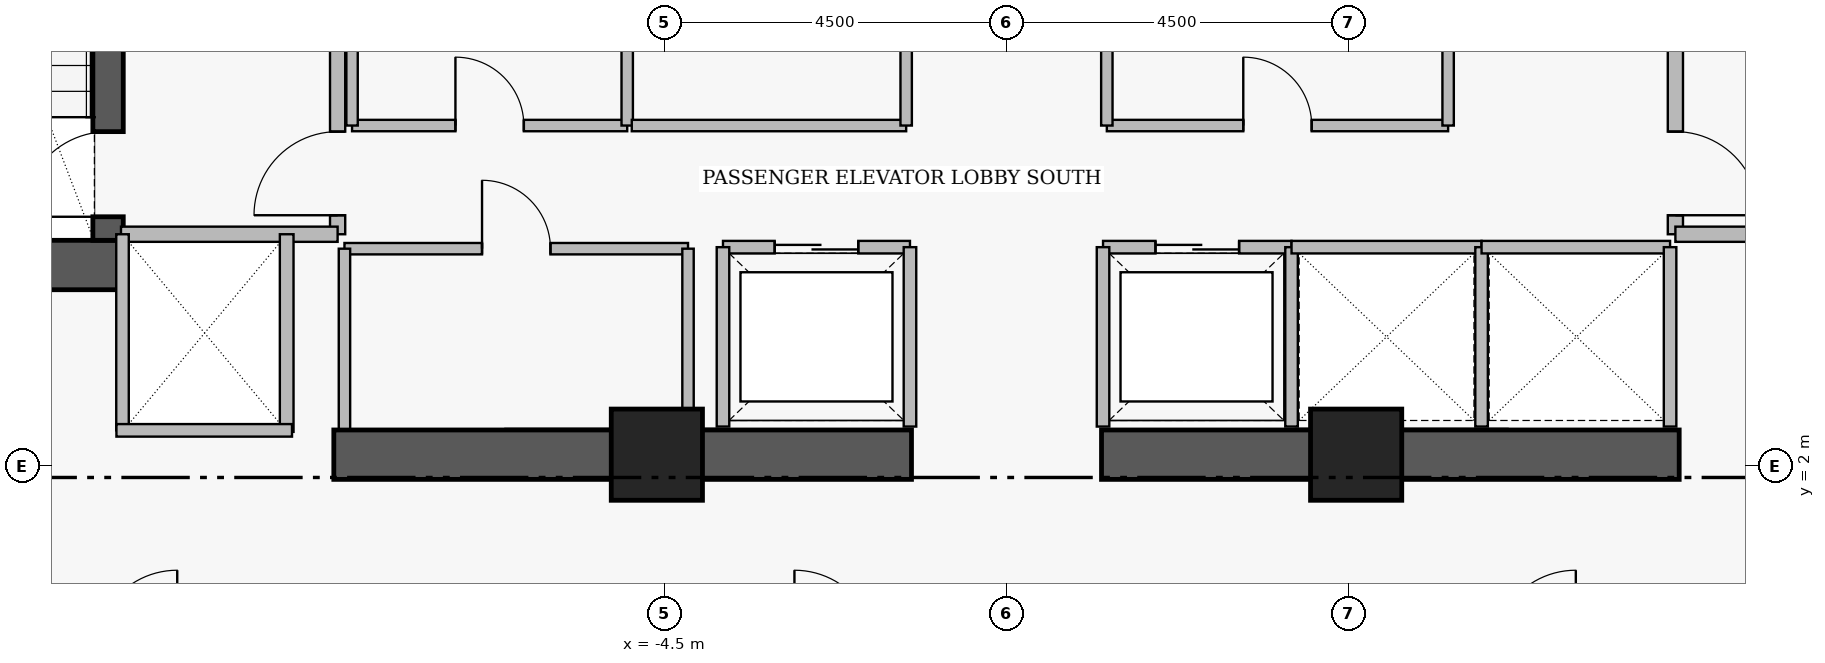
"""IFC4 building model, lengths in metres.
Left out: names, types, materials, properties, quantities, classifications, styles, units other than length and angle.
Written with IfcOpenShell. Run it as: python <this file> out.ifc"""

import sys

from ifc_helpers import new_model, si_unit, direction, frame, frame_2d, origin, origin_2d, place, context, subcontext, project, spatial, rectangle, extrude, element, fill, save


model = new_model("IFC4")
c1 = context("Model", 3, precision=1e-05, world=origin(), true_north=direction((0.0, 1.0)))
c2 = subcontext(c1, "Body", "Model", "MODEL_VIEW")
j1 = project(units=[si_unit("LENGTHUNIT", "METRE"), si_unit("PLANEANGLEUNIT", "RADIAN")], contexts=[c1])
p1 = place(None, origin())
s1 = spatial("IfcSite", under=j1, at=p1, CompositionType="ELEMENT")
p2 = place(p1, origin())
s2 = spatial("IfcBuilding", under=s1, at=p2, CompositionType="ELEMENT")
p3 = place(p2, frame((0.0, 0.0, 172.8)))
s3 = spatial("IfcBuildingStorey", under=s2, at=p3, CompositionType="ELEMENT", Elevation=172.8)
p4 = place(p3, frame((-16.06, 4.645, 0.0), z_axis=(0.0, 0.0, 1.0), x_axis=(1.0, 0.0, 0.0)))
e1 = element("IfcWall", 1, at=p4, inside=s3, PredefinedType="SHEAR", context=c2, shape_type="SweptSolid", body=[
    extrude(rectangle(XDim=4.46, YDim=0.65, at=frame_2d((2.23, 0.0))), origin(), (0.0, 0.0, 1.0), 4.41),
])
for number, where, z_axis, x_axis in (
    (2, (-8.85, 2.15, 0.0), (0.0, 0.0, 1.0), (1.0, 0.0, 0.0)),
    (3, (1.25, 2.15, 0.0), (0.0, 0.0, 1.0), (1.0, 0.0, 0.0)),
):
    element("IfcWall", number, at=place(p3, frame(where, z_axis=z_axis, x_axis=x_axis)), inside=s3, PredefinedType="SHEAR", context=c2, shape_type="SweptSolid", body=[
        extrude(rectangle(XDim=7.6, YDim=0.65, at=frame_2d((3.8, 0.0))), origin(), (0.0, 0.0, 1.0), 4.38),
    ])
p5 = place(p3, frame((-11.82, 4.97, 0.0), z_axis=(0.0, 0.0, 1.0), x_axis=(0.0, 1.0, 0.0)))
e4 = element("IfcWall", 4, at=p5, inside=s3, PredefinedType="SHEAR", context=c2, shape_type="SweptSolid", body=[
    extrude(rectangle(XDim=8.96, YDim=0.4, at=frame_2d((4.48, 0.0))), origin(), (0.0, 0.0, 1.0), 4.41),
])
p6 = place(p5, frame((0.31, 0.0, 0.0)))
e5 = element("IfcOpeningElement", 5, at=p6, cuts=e4, PredefinedType="OPENING", context=c2, shape_type="SweptSolid", body=[
    extrude(rectangle(XDim=1.12, YDim=2.22, at=frame_2d((0.56, 1.11))), frame((0.0, 0.21, 0.0), z_axis=(0.0, -1.0, 0.0), x_axis=(1.0, 0.0, 0.0)), (0.0, 0.0, 1.0), 0.42),
])
for number, where, z_axis, x_axis in (
    (6, (-4.6, 2.15, 0.0), (0.0, 0.0, 1.0), (1.0, 0.0, 0.0)),
    (7, (4.6, 2.15, 0.0), (0.0, 0.0, 1.0), (1.0, 0.0, 0.0)),
):
    element("IfcColumn", number, at=place(p3, frame(where, z_axis=z_axis, x_axis=x_axis)), inside=s3, PredefinedType="COLUMN", context=c2, shape_type="SweptSolid", body=[
        extrude(rectangle(XDim=1.2, YDim=1.2, at=origin_2d()), origin(), (0.0, 0.0, 1.0), 4.6),
    ])
p7 = place(p3, frame((-8.8, 5.05, 0.0), z_axis=(0.0, 0.0, 1.0), x_axis=(0.0, 1.0, 0.0)))
e8 = element("IfcWall", 8, at=p7, inside=s3, PredefinedType="PARTITIONING", context=c2, shape_type="SweptSolid", body=[
    extrude(rectangle(XDim=6.1, YDim=0.2, at=frame_2d((3.05, 0.0))), origin(), (0.0, 0.0, 1.0), 4.38),
])
p8 = place(p7, frame((0.25, 0.0, 0.0)))
e9 = element("IfcOpeningElement", 9, at=p8, cuts=e8, PredefinedType="OPENING", context=c2, shape_type="SweptSolid", body=[
    extrude(rectangle(XDim=1.1, YDim=2.2, at=frame_2d((0.55, 1.1))), frame((0.0, 0.11, 0.0), z_axis=(0.0, -1.0, 0.0), x_axis=(1.0, 0.0, 0.0)), (0.0, 0.0, 1.0), 0.22),
])
p9 = place(p7, frame((3.85, 0.0, 0.0)))
e10 = element("IfcOpeningElement", 10, at=p9, cuts=e8, PredefinedType="OPENING", context=c2, shape_type="SweptSolid", body=[
    extrude(rectangle(XDim=1.1, YDim=2.2, at=frame_2d((0.55, 1.1))), frame((0.0, 0.11, 0.0), z_axis=(0.0, -1.0, 0.0), x_axis=(1.0, 0.0, 0.0)), (0.0, 0.0, 1.0), 0.22),
])
p10 = place(p3, frame((8.8, 11.15, 0.0), z_axis=(0.0, 0.0, 1.0), x_axis=(0.0, -1.0, 0.0)))
e11 = element("IfcWall", 11, at=p10, inside=s3, PredefinedType="PARTITIONING", context=c2, shape_type="SweptSolid", body=[
    extrude(rectangle(XDim=6.1, YDim=0.2, at=frame_2d((3.05, 0.0))), origin(), (0.0, 0.0, 1.0), 4.38),
])
p11 = place(p10, frame((1.15, 0.0, 0.0)))
e12 = element("IfcOpeningElement", 12, at=p11, cuts=e11, PredefinedType="OPENING", context=c2, shape_type="SweptSolid", body=[
    extrude(rectangle(XDim=1.1, YDim=2.2, at=frame_2d((0.55, 1.1))), frame((0.0, 0.11, 0.0), z_axis=(0.0, -1.0, 0.0), x_axis=(1.0, 0.0, 0.0)), (0.0, 0.0, 1.0), 0.22),
])
p12 = place(p10, frame((4.75, 0.0, 0.0)))
e13 = element("IfcOpeningElement", 13, at=p12, cuts=e11, PredefinedType="OPENING", context=c2, shape_type="SweptSolid", body=[
    extrude(rectangle(XDim=1.1, YDim=2.2, at=frame_2d((0.55, 1.1))), frame((0.0, 0.11, 0.0), z_axis=(0.0, -1.0, 0.0), x_axis=(1.0, 0.0, 0.0)), (0.0, 0.0, 1.0), 0.22),
])
p13 = place(p3, frame((-3.73, 4.88, 0.0), z_axis=(0.0, 0.0, 1.0), x_axis=(1.0, 0.0, 0.0)))
e14 = element("IfcWall", 14, at=p13, inside=s3, PredefinedType="PARTITIONING", context=c2, shape_type="SweptSolid", body=[
    extrude(rectangle(XDim=2.46, YDim=0.165, at=frame_2d((1.23, 0.0))), origin(), (0.0, 0.0, 1.0), 4.38),
])
p14 = place(p13, frame((0.68, 0.0, 0.0)))
e15 = element("IfcOpeningElement", 15, at=p14, cuts=e14, PredefinedType="OPENING", context=c2, shape_type="SweptSolid", body=[
    extrude(rectangle(XDim=1.1, YDim=2.25, at=frame_2d((0.55, 1.125))), frame((0.0, 0.093, 0.0), z_axis=(0.0, -1.0, 0.0), x_axis=(1.0, 0.0, 0.0)), (0.0, 0.0, 1.0), 0.185),
])
p15 = place(p3, frame((1.27, 4.88, 0.0), z_axis=(0.0, 0.0, 1.0), x_axis=(1.0, 0.0, 0.0)))
e16 = element("IfcWall", 16, at=p15, inside=s3, PredefinedType="PARTITIONING", context=c2, shape_type="SweptSolid", body=[
    extrude(rectangle(XDim=2.48, YDim=0.165, at=frame_2d((1.24, 0.0))), origin(), (0.0, 0.0, 1.0), 4.38),
])
p16 = place(p15, frame((0.69, 0.0, 0.0)))
e17 = element("IfcOpeningElement", 17, at=p16, cuts=e16, PredefinedType="OPENING", context=c2, shape_type="SweptSolid", body=[
    extrude(rectangle(XDim=1.1, YDim=2.25, at=frame_2d((0.55, 1.125))), frame((0.0, 0.093, 0.0), z_axis=(0.0, -1.0, 0.0), x_axis=(1.0, 0.0, 0.0)), (0.0, 0.0, 1.0), 0.185),
])
p17 = place(p3, frame((-8.71, 4.86, 0.0), z_axis=(0.0, 0.0, 1.0), x_axis=(1.0, 0.0, 0.0)))
e18 = element("IfcWall", 18, at=p17, inside=s3, PredefinedType="PARTITIONING", context=c2, shape_type="SweptSolid", body=[
    extrude(rectangle(XDim=4.52, YDim=0.15, at=frame_2d((2.26, 0.0))), origin(), (0.0, 0.0, 1.0), 4.38),
])
p18 = place(p17, frame((1.81, 0.0, 0.0)))
e19 = element("IfcOpeningElement", 19, at=p18, cuts=e18, PredefinedType="OPENING", context=c2, shape_type="SweptSolid", body=[
    extrude(rectangle(XDim=0.9, YDim=2.15, at=frame_2d((0.45, 1.075))), frame((0.0, 0.085, 0.0), z_axis=(0.0, -1.0, 0.0), x_axis=(1.0, 0.0, 0.0)), (0.0, 0.0, 1.0), 0.17),
])
p19 = place(p3, frame((-8.61, 6.48, 0.0), z_axis=(0.0, 0.0, 1.0), x_axis=(1.0, 0.0, 0.0)))
e20 = element("IfcWall", 20, at=p19, inside=s3, PredefinedType="PARTITIONING", context=c2, shape_type="SweptSolid", body=[
    extrude(rectangle(XDim=3.62, YDim=0.15, at=frame_2d((1.81, 0.0))), origin(), (0.0, 0.0, 1.0), 4.38),
])
p20 = place(p19, frame((1.36, 0.0, 0.0)))
e21 = element("IfcOpeningElement", 21, at=p20, cuts=e20, PredefinedType="OPENING", context=c2, shape_type="SweptSolid", body=[
    extrude(rectangle(XDim=0.9, YDim=2.15, at=frame_2d((0.45, 1.075))), frame((0.0, 0.085, 0.0), z_axis=(0.0, -1.0, 0.0), x_axis=(1.0, 0.0, 0.0)), (0.0, 0.0, 1.0), 0.17),
])
p21 = place(p3, frame((1.32, 6.48, 0.0), z_axis=(0.0, 0.0, 1.0), x_axis=(1.0, 0.0, 0.0)))
e22 = element("IfcWall", 22, at=p21, inside=s3, PredefinedType="PARTITIONING", context=c2, shape_type="SweptSolid", body=[
    extrude(rectangle(XDim=4.49, YDim=0.15, at=frame_2d((2.245, 0.0))), origin(), (0.0, 0.0, 1.0), 4.38),
])
p22 = place(p21, frame((1.795, 0.0, 0.0)))
e23 = element("IfcOpeningElement", 23, at=p22, cuts=e22, PredefinedType="OPENING", context=c2, shape_type="SweptSolid", body=[
    extrude(rectangle(XDim=0.9, YDim=2.15, at=frame_2d((0.45, 1.075))), frame((0.0, 0.085, 0.0), z_axis=(0.0, -1.0, 0.0), x_axis=(1.0, 0.0, 0.0)), (0.0, 0.0, 1.0), 0.17),
])
for number, where, z_axis, x_axis in (
    (24, (-11.65, 5.05, 0.0), (0.0, 0.0, 1.0), (1.0, 0.0, 0.0)),
    (25, (8.8, 5.05, 0.0), (0.0, 0.0, 1.0), (1.0, 0.0, 0.0)),
):
    element("IfcWall", number, at=place(p3, frame(where, z_axis=z_axis, x_axis=x_axis)), inside=s3, PredefinedType="PARTITIONING", context=c2, shape_type="SweptSolid", body=[
        extrude(rectangle(XDim=2.85, YDim=0.2, at=frame_2d((1.425, 0.0))), origin(), (0.0, 0.0, 1.0), 4.38),
    ])
for number, where, z_axis, x_axis in (
    (26, (-3.73, 2.52, 0.0), (0.0, 0.0, 1.0), (0.0, 1.0, 0.0)),
    (27, (-1.27, 2.52, 0.0), (0.0, 0.0, 1.0), (0.0, 1.0, 0.0)),
    (28, (1.27, 2.52, 0.0), (0.0, 0.0, 1.0), (0.0, 1.0, 0.0)),
    (29, (3.75, 2.52, 0.0), (0.0, 0.0, 1.0), (0.0, 1.0, 0.0)),
):
    element("IfcWall", number, at=place(p3, frame(where, z_axis=z_axis, x_axis=x_axis)), inside=s3, PredefinedType="PARTITIONING", context=c2, shape_type="SweptSolid", body=[
        extrude(rectangle(XDim=2.36, YDim=0.165, at=frame_2d((1.18, 0.0))), origin(), (0.0, 0.0, 1.0), 4.38),
    ])
p23 = place(p3, frame((3.75, 4.88, 0.0), z_axis=(0.0, 0.0, 1.0), x_axis=(1.0, 0.0, 0.0)))
e30 = element("IfcWall", 30, at=p23, inside=s3, PredefinedType="PARTITIONING", context=c2, shape_type="SweptSolid", body=[
    extrude(rectangle(XDim=2.5, YDim=0.165, at=frame_2d((1.25, 0.0))), origin(), (0.0, 0.0, 1.0), 4.38),
])
p24 = place(p3, frame((6.25, 2.52, 0.0), z_axis=(0.0, 0.0, 1.0), x_axis=(0.0, 1.0, 0.0)))
e31 = element("IfcWall", 31, at=p24, inside=s3, PredefinedType="PARTITIONING", context=c2, shape_type="SweptSolid", body=[
    extrude(rectangle(XDim=2.36, YDim=0.165, at=frame_2d((1.18, 0.0))), origin(), (0.0, 0.0, 1.0), 4.38),
])
p25 = place(p3, frame((6.25, 4.88, 0.0), z_axis=(0.0, 0.0, 1.0), x_axis=(1.0, 0.0, 0.0)))
e32 = element("IfcWall", 32, at=p25, inside=s3, PredefinedType="PARTITIONING", context=c2, shape_type="SweptSolid", body=[
    extrude(rectangle(XDim=2.48, YDim=0.165, at=frame_2d((1.24, 0.0))), origin(), (0.0, 0.0, 1.0), 4.38),
])
p26 = place(p3, frame((8.73, 2.52, 0.0), z_axis=(0.0, 0.0, 1.0), x_axis=(0.0, 1.0, 0.0)))
e33 = element("IfcWall", 33, at=p26, inside=s3, PredefinedType="PARTITIONING", context=c2, shape_type="SweptSolid", body=[
    extrude(rectangle(XDim=2.36, YDim=0.165, at=frame_2d((1.18, 0.0))), origin(), (0.0, 0.0, 1.0), 4.38),
])
for number, where, z_axis, x_axis in (
    (34, (-8.71, 2.49, 0.0), (0.0, 0.0, 1.0), (0.0, 1.0, 0.0)),
    (35, (-4.19, 2.49, 0.0), (0.0, 0.0, 1.0), (0.0, 1.0, 0.0)),
):
    element("IfcWall", number, at=place(p3, frame(where, z_axis=z_axis, x_axis=x_axis)), inside=s3, PredefinedType="PARTITIONING", context=c2, shape_type="SweptSolid", body=[
        extrude(rectangle(XDim=2.37, YDim=0.15, at=frame_2d((1.185, 0.0))), origin(), (0.0, 0.0, 1.0), 4.38),
    ])
p27 = place(p3, frame((-9.47, 2.45, 0.0), z_axis=(0.0, 0.0, 1.0), x_axis=(0.0, 1.0, 0.0)))
e36 = element("IfcWall", 36, at=p27, inside=s3, PredefinedType="PARTITIONING", context=c2, shape_type="SweptSolid", body=[
    extrude(rectangle(XDim=2.6, YDim=0.18, at=frame_2d((1.3, 0.0))), origin(), (0.0, 0.0, 1.0), 4.38),
])
p28 = place(p3, frame((-11.63, 2.47, 0.0), z_axis=(0.0, 0.0, 1.0), x_axis=(0.0, 1.0, 0.0)))
e37 = element("IfcWall", 37, at=p28, inside=s3, PredefinedType="PARTITIONING", context=c2, shape_type="SweptSolid", body=[
    extrude(rectangle(XDim=2.58, YDim=0.165, at=frame_2d((1.29, 0.0))), origin(), (0.0, 0.0, 1.0), 4.38),
])
p29 = place(p3, frame((-11.71, 2.47, 0.0), z_axis=(0.0, 0.0, 1.0), x_axis=(1.0, 0.0, 0.0)))
e38 = element("IfcWall", 38, at=p29, inside=s3, PredefinedType="PARTITIONING", context=c2, shape_type="SweptSolid", body=[
    extrude(rectangle(XDim=2.31, YDim=0.165, at=frame_2d((1.155, 0.0))), origin(), (0.0, 0.0, 1.0), 3.28),
])
for number, where, z_axis, x_axis in (
    (39, (-8.61, 6.48, 0.0), (0.0, 0.0, 1.0), (0.0, 1.0, 0.0)),
    (40, (-4.99, 6.48, 0.0), (0.0, 0.0, 1.0), (0.0, 1.0, 0.0)),
):
    element("IfcWall", number, at=place(p3, frame(where, z_axis=z_axis, x_axis=x_axis)), inside=s3, PredefinedType="PARTITIONING", context=c2, shape_type="SweptSolid", body=[
        extrude(rectangle(XDim=2.24, YDim=0.15, at=frame_2d((1.12, 0.0))), origin(), (0.0, 0.0, 1.0), 4.38),
    ])
p30 = place(p3, frame((-4.93, 6.48, 0.0), z_axis=(0.0, 0.0, 1.0), x_axis=(1.0, 0.0, 0.0)))
e41 = element("IfcWall", 41, at=p30, inside=s3, PredefinedType="PARTITIONING", context=c2, shape_type="SweptSolid", body=[
    extrude(rectangle(XDim=3.61, YDim=0.15, at=frame_2d((1.805, 0.0))), origin(), (0.0, 0.0, 1.0), 4.38),
])
for number, where, z_axis, x_axis in (
    (42, (-1.32, 6.48, 0.0), (0.0, 0.0, 1.0), (0.0, 1.0, 0.0)),
    (43, (1.32, 6.48, 0.0), (0.0, 0.0, 1.0), (0.0, 1.0, 0.0)),
    (44, (5.81, 6.48, 0.0), (0.0, 0.0, 1.0), (0.0, 1.0, 0.0)),
):
    element("IfcWall", number, at=place(p3, frame(where, z_axis=z_axis, x_axis=x_axis)), inside=s3, PredefinedType="PARTITIONING", context=c2, shape_type="SweptSolid", body=[
        extrude(rectangle(XDim=2.24, YDim=0.15, at=frame_2d((1.12, 0.0))), origin(), (0.0, 0.0, 1.0), 4.38),
    ])
p31 = place(p6, origin())
e45 = element("IfcDoor", 45, at=p31, inside=s3, OperationType="SINGLE_SWING_LEFT", PredefinedType="DOOR", context=c2, shape_type="SweptSolid", body=[
    extrude(rectangle(XDim=1.12, YDim=2.22, at=frame_2d((0.56, 1.11))), frame((0.0, 0.025, 0.0), z_axis=(0.0, -1.0, 0.0), x_axis=(1.0, 0.0, 0.0)), (0.0, 0.0, 1.0), 0.05),
])
fill(e5, e45)
p32 = place(p8, origin())
e46 = element("IfcDoor", 46, at=p32, inside=s3, OperationType="SINGLE_SWING_LEFT", PredefinedType="DOOR", context=c2, shape_type="SweptSolid", body=[
    extrude(rectangle(XDim=1.1, YDim=2.2, at=frame_2d((0.55, 1.1))), frame((0.0, 0.025, 0.0), z_axis=(0.0, -1.0, 0.0), x_axis=(1.0, 0.0, 0.0)), (0.0, 0.0, 1.0), 0.05),
])
fill(e9, e46)
p33 = place(p12, origin())
e47 = element("IfcDoor", 47, at=p33, inside=s3, OperationType="SINGLE_SWING_RIGHT", PredefinedType="DOOR", context=c2, shape_type="SweptSolid", body=[
    extrude(rectangle(XDim=1.1, YDim=2.2, at=frame_2d((0.55, 1.1))), frame((0.0, 0.025, 0.0), z_axis=(0.0, -1.0, 0.0), x_axis=(1.0, 0.0, 0.0)), (0.0, 0.0, 1.0), 0.05),
])
fill(e13, e47)
p34 = place(p14, origin())
e48 = element("IfcDoor", 48, at=p34, inside=s3, OperationType="SLIDING_TO_LEFT", PredefinedType="DOOR", context=c2, shape_type="SweptSolid", body=[
    extrude(rectangle(XDim=1.1, YDim=2.25, at=frame_2d((0.55, 1.125))), frame((0.0, 0.025, 0.0), z_axis=(0.0, -1.0, 0.0), x_axis=(1.0, 0.0, 0.0)), (0.0, 0.0, 1.0), 0.05),
])
fill(e15, e48)
p35 = place(p16, origin())
e49 = element("IfcDoor", 49, at=p35, inside=s3, OperationType="SLIDING_TO_LEFT", PredefinedType="DOOR", context=c2, shape_type="SweptSolid", body=[
    extrude(rectangle(XDim=1.1, YDim=2.25, at=frame_2d((0.55, 1.125))), frame((0.0, 0.025, 0.0), z_axis=(0.0, -1.0, 0.0), x_axis=(1.0, 0.0, 0.0)), (0.0, 0.0, 1.0), 0.05),
])
fill(e17, e49)
p36 = place(p18, origin())
e50 = element("IfcDoor", 50, at=p36, inside=s3, OperationType="SINGLE_SWING_LEFT", PredefinedType="DOOR", context=c2, shape_type="SweptSolid", body=[
    extrude(rectangle(XDim=0.9, YDim=2.15, at=frame_2d((0.45, 1.075))), frame((0.0, 0.025, 0.0), z_axis=(0.0, -1.0, 0.0), x_axis=(1.0, 0.0, 0.0)), (0.0, 0.0, 1.0), 0.05),
])
fill(e19, e50)
p37 = place(p20, origin())
e51 = element("IfcDoor", 51, at=p37, inside=s3, OperationType="SINGLE_SWING_LEFT", PredefinedType="DOOR", context=c2, shape_type="SweptSolid", body=[
    extrude(rectangle(XDim=0.9, YDim=2.15, at=frame_2d((0.45, 1.075))), frame((0.0, 0.025, 0.0), z_axis=(0.0, -1.0, 0.0), x_axis=(1.0, 0.0, 0.0)), (0.0, 0.0, 1.0), 0.05),
])
fill(e21, e51)
p38 = place(p22, origin())
e52 = element("IfcDoor", 52, at=p38, inside=s3, OperationType="SINGLE_SWING_LEFT", PredefinedType="DOOR", context=c2, shape_type="SweptSolid", body=[
    extrude(rectangle(XDim=0.9, YDim=2.15, at=frame_2d((0.45, 1.075))), frame((0.0, 0.025, 0.0), z_axis=(0.0, -1.0, 0.0), x_axis=(1.0, 0.0, 0.0)), (0.0, 0.0, 1.0), 0.05),
])
fill(e23, e52)
save(model, sys.argv[1])
